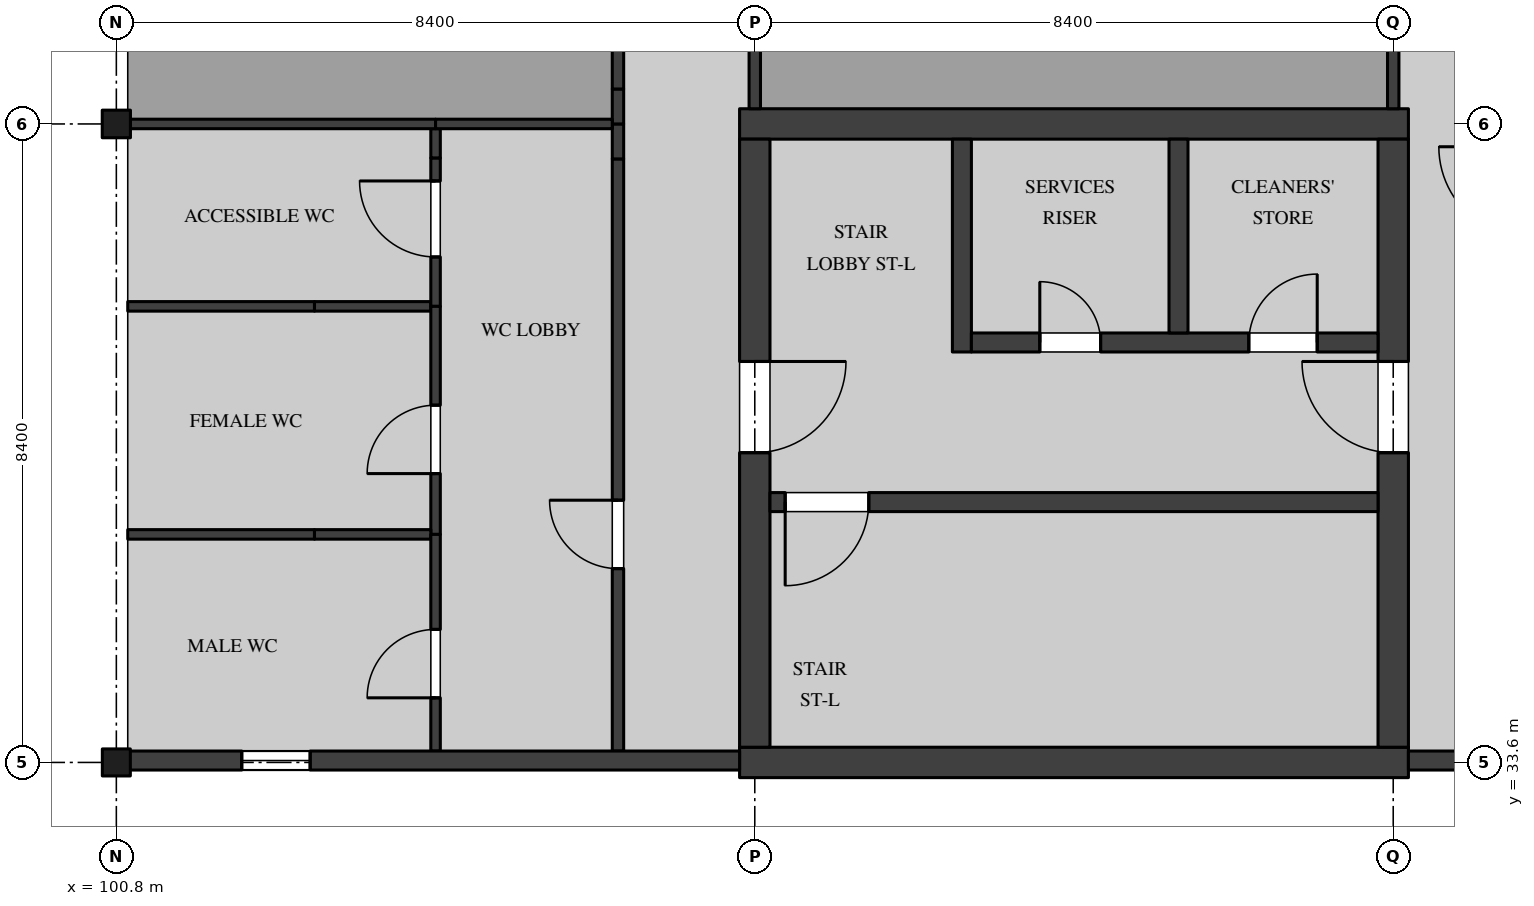
"""IFC4 building model, lengths in metres.
Left out: names, types, materials, properties, quantities, classifications, styles, units other than length and angle.
Written with IfcOpenShell. Run it as: python <this file> out.ifc"""

import sys

from ifc_helpers import new_model, si_unit, direction, frame, frame_2d, origin, origin_2d, place, context, subcontext, project, spatial, rectangle, i_section, extrude, element, fill, save


model = new_model("IFC4")
c1 = context("Model", 3, precision=1e-05, world=origin(), true_north=direction((0.0, 1.0)))
c2 = subcontext(c1, "Body", "Model", "MODEL_VIEW")
j1 = project(units=[si_unit("LENGTHUNIT", "METRE"), si_unit("PLANEANGLEUNIT", "RADIAN")], contexts=[c1])
p1 = place(None, origin())
s1 = spatial("IfcSite", under=j1, at=p1, CompositionType="ELEMENT")
p2 = place(p1, origin())
s2 = spatial("IfcBuilding", under=s1, at=p2, CompositionType="ELEMENT")
p3 = place(p2, frame((0.0, 0.0, 27.9)))
s3 = spatial("IfcBuildingStorey", under=s2, at=p3, CompositionType="ELEMENT", Elevation=27.9)
p4 = place(p3, frame((100.8, 33.6, 0.0), z_axis=(0.0, 0.0, 1.0), x_axis=(1.0, 0.0, 0.0)))
e1 = element("IfcColumn", 1, at=p4, inside=s3, PredefinedType="COLUMN", context=c2, shape_type="SweptSolid", body=[
    extrude(i_section(OverallWidth=0.368, OverallDepth=0.356, WebThickness=0.011, FlangeThickness=0.018, FilletRadius=0.015, at=origin_2d()), origin(), (0.0, 0.0, 1.0), 4.37),
])
p5 = place(p3, frame((100.8, 42.0, 0.0), z_axis=(0.0, 0.0, 1.0), x_axis=(1.0, 0.0, 0.0)))
e2 = element("IfcColumn", 2, at=p5, inside=s3, PredefinedType="COLUMN", context=c2, shape_type="SweptSolid", body=[
    extrude(i_section(OverallWidth=0.371, OverallDepth=0.363, WebThickness=0.013, FlangeThickness=0.022, FilletRadius=0.015, at=origin_2d()), origin(), (0.0, 0.0, 1.0), 4.37),
])
for number, where, z_axis, x_axis in (
    (3, (109.0, 33.6, 0.0), (0.0, 0.0, 1.0), (1.0, 0.0, 0.0)),
    (4, (109.0, 42.0, 0.0), (0.0, 0.0, 1.0), (1.0, 0.0, 0.0)),
):
    element("IfcWall", number, at=place(p3, frame(where, z_axis=z_axis, x_axis=x_axis)), inside=s3, PredefinedType="SHEAR", context=c2, shape_type="SweptSolid", body=[
        extrude(rectangle(XDim=8.8, YDim=0.4, at=frame_2d((4.4, 0.0))), origin(), (0.0, 0.0, 1.0), 4.37),
    ])
p6 = place(p3, frame((109.2, 33.8, 0.0), z_axis=(0.0, 0.0, 1.0), x_axis=(0.0, 1.0, 0.0)))
e5 = element("IfcWall", 5, at=p6, inside=s3, PredefinedType="SHEAR", context=c2, shape_type="SweptSolid", body=[
    extrude(rectangle(XDim=8.0, YDim=0.4, at=frame_2d((4.0, 0.0))), origin(), (0.0, 0.0, 1.0), 4.37),
])
p7 = place(p6, frame((3.875, 0.0, 0.0)))
e6 = element("IfcOpeningElement", 6, at=p7, cuts=e5, PredefinedType="OPENING", context=c2, shape_type="SweptSolid", body=[
    extrude(rectangle(XDim=1.2, YDim=2.1, at=frame_2d((0.6, 1.05))), frame((0.0, 0.21, 0.0), z_axis=(0.0, -1.0, 0.0), x_axis=(1.0, 0.0, 0.0)), (0.0, 0.0, 1.0), 0.42),
])
p8 = place(p3, frame((117.6, 33.8, 0.0), z_axis=(0.0, 0.0, 1.0), x_axis=(0.0, 1.0, 0.0)))
e7 = element("IfcWall", 7, at=p8, inside=s3, PredefinedType="SHEAR", context=c2, shape_type="SweptSolid", body=[
    extrude(rectangle(XDim=8.0, YDim=0.4, at=frame_2d((4.0, 0.0))), origin(), (0.0, 0.0, 1.0), 4.37),
])
p9 = place(p8, frame((3.875, 0.0, 0.0)))
e8 = element("IfcOpeningElement", 8, at=p9, cuts=e7, PredefinedType="OPENING", context=c2, shape_type="SweptSolid", body=[
    extrude(rectangle(XDim=1.2, YDim=2.1, at=frame_2d((0.6, 1.05))), frame((0.0, 0.21, 0.0), z_axis=(0.0, -1.0, 0.0), x_axis=(1.0, 0.0, 0.0)), (0.0, 0.0, 1.0), 0.42),
])
p10 = place(p3, frame((109.4, 37.025, 0.0), z_axis=(0.0, 0.0, 1.0), x_axis=(1.0, 0.0, 0.0)))
e9 = element("IfcWall", 9, at=p10, inside=s3, PredefinedType="SOLIDWALL", context=c2, shape_type="SweptSolid", body=[
    extrude(rectangle(XDim=8.0, YDim=0.25, at=frame_2d((4.0, 0.0))), origin(), (0.0, 0.0, 1.0), 4.37),
])
p11 = place(p10, frame((0.2, 0.0, 0.0)))
e10 = element("IfcOpeningElement", 10, at=p11, cuts=e9, PredefinedType="OPENING", context=c2, shape_type="SweptSolid", body=[
    extrude(rectangle(XDim=1.1, YDim=2.1, at=frame_2d((0.55, 1.05))), frame((0.0, 0.135, 0.0), z_axis=(0.0, -1.0, 0.0), x_axis=(1.0, 0.0, 0.0)), (0.0, 0.0, 1.0), 0.27),
])
p12 = place(p3, frame((111.925, 39.0, 0.0), z_axis=(0.0, 0.0, 1.0), x_axis=(0.0, 1.0, 0.0)))
e11 = element("IfcWall", 11, at=p12, inside=s3, PredefinedType="SOLIDWALL", context=c2, shape_type="SweptSolid", body=[
    extrude(rectangle(XDim=2.8, YDim=0.25, at=frame_2d((1.4, 0.0))), origin(), (0.0, 0.0, 1.0), 4.37),
])
p13 = place(p3, frame((112.05, 39.125, 0.0), z_axis=(0.0, 0.0, 1.0), x_axis=(1.0, 0.0, 0.0)))
e12 = element("IfcWall", 12, at=p13, inside=s3, PredefinedType="SOLIDWALL", context=c2, shape_type="SweptSolid", body=[
    extrude(rectangle(XDim=5.35, YDim=0.25, at=frame_2d((2.675, 0.0))), origin(), (0.0, 0.0, 1.0), 4.37),
])
p14 = place(p13, frame((3.65, 0.0, 0.0)))
e13 = element("IfcOpeningElement", 13, at=p14, cuts=e12, PredefinedType="OPENING", context=c2, shape_type="SweptSolid", body=[
    extrude(rectangle(XDim=0.9, YDim=2.1, at=frame_2d((0.45, 1.05))), frame((0.0, 0.135, 0.0), z_axis=(0.0, -1.0, 0.0), x_axis=(1.0, 0.0, 0.0)), (0.0, 0.0, 1.0), 0.27),
])
p15 = place(p13, frame((0.9, 0.0, 0.0)))
e14 = element("IfcOpeningElement", 14, at=p15, cuts=e12, PredefinedType="OPENING", context=c2, shape_type="SweptSolid", body=[
    extrude(rectangle(XDim=0.8, YDim=2.1, at=frame_2d((0.4, 1.05))), frame((0.0, 0.135, 0.0), z_axis=(0.0, -1.0, 0.0), x_axis=(1.0, 0.0, 0.0)), (0.0, 0.0, 1.0), 0.27),
])
p16 = place(p3, frame((114.775, 39.25, 0.0), z_axis=(0.0, 0.0, 1.0), x_axis=(0.0, 1.0, 0.0)))
e15 = element("IfcWall", 15, at=p16, inside=s3, PredefinedType="SOLIDWALL", context=c2, shape_type="SweptSolid", body=[
    extrude(rectangle(XDim=2.55, YDim=0.25, at=frame_2d((1.275, 0.0))), origin(), (0.0, 0.0, 1.0), 4.37),
])
p17 = place(p3, frame((117.6, 42.2, 0.0), z_axis=(0.0, 0.0, 1.0), x_axis=(0.0, 1.0, 0.0)))
e16 = element("IfcWall", 16, at=p17, inside=s3, PredefinedType="PARTITIONING", context=c2, shape_type="SweptSolid", body=[
    extrude(rectangle(XDim=8.0, YDim=0.15, at=frame_2d((4.0, 0.0))), origin(), (0.0, 0.0, 1.0), 3.746),
])
p18 = place(p17, frame((3.4, 0.0, 0.0)))
e17 = element("IfcOpeningElement", 17, at=p18, cuts=e16, PredefinedType="OPENING", context=c2, shape_type="SweptSolid", body=[
    extrude(rectangle(XDim=1.2, YDim=2.4, at=frame_2d((0.6, 1.2))), frame((0.0, 0.085, 0.0), z_axis=(0.0, -1.0, 0.0), x_axis=(1.0, 0.0, 0.0)), (0.0, 0.0, 1.0), 0.17),
])
p19 = place(p3, frame((109.2, 42.2, 0.0), z_axis=(0.0, 0.0, 1.0), x_axis=(0.0, 1.0, 0.0)))
e18 = element("IfcWall", 18, at=p19, inside=s3, PredefinedType="PARTITIONING", context=c2, shape_type="SweptSolid", body=[
    extrude(rectangle(XDim=8.0, YDim=0.15, at=frame_2d((4.0, 0.0))), origin(), (0.0, 0.0, 1.0), 3.746),
])
p20 = place(p19, frame((3.4, 0.0, 0.0)))
e19 = element("IfcOpeningElement", 19, at=p20, cuts=e18, PredefinedType="OPENING", context=c2, shape_type="SweptSolid", body=[
    extrude(rectangle(XDim=1.2, YDim=2.4, at=frame_2d((0.6, 1.2))), frame((0.0, 0.085, 0.0), z_axis=(0.0, -1.0, 0.0), x_axis=(1.0, 0.0, 0.0)), (0.0, 0.0, 1.0), 0.17),
])
p21 = place(p3, frame((107.4, 33.75, 0.0), z_axis=(0.0, 0.0, 1.0), x_axis=(0.0, 1.0, 0.0)))
e20 = element("IfcWall", 20, at=p21, inside=s3, PredefinedType="PARTITIONING", context=c2, shape_type="SweptSolid", body=[
    extrude(rectangle(XDim=7.79, YDim=0.15, at=frame_2d((3.895, 0.0))), origin(), (0.0, 0.0, 1.0), 4.37),
])
p22 = place(p21, frame((2.4, 0.0, 0.0)))
e21 = element("IfcOpeningElement", 21, at=p22, cuts=e20, PredefinedType="OPENING", context=c2, shape_type="SweptSolid", body=[
    extrude(rectangle(XDim=0.9, YDim=2.1, at=frame_2d((0.45, 1.05))), frame((0.0, 0.085, 0.0), z_axis=(0.0, -1.0, 0.0), x_axis=(1.0, 0.0, 0.0)), (0.0, 0.0, 1.0), 0.17),
])
for number, where, z_axis, x_axis in (
    (22, (107.4, 41.54, 0.0), (0.0, 0.0, 1.0), (0.0, 1.0, 0.0)),
    (23, (107.4, 42.0, 0.0), (0.0, 0.0, 1.0), (0.0, 1.0, 0.0)),
):
    element("IfcWall", number, at=place(p3, frame(where, z_axis=z_axis, x_axis=x_axis)), inside=s3, PredefinedType="PARTITIONING", context=c2, shape_type="SweptSolid", body=[
        extrude(rectangle(XDim=0.46, YDim=0.15, at=frame_2d((0.23, 0.0))), origin(), (0.0, 0.0, 1.0), 3.746),
    ])
p23 = place(p3, frame((107.4, 42.46, 0.0), z_axis=(0.0, 0.0, 1.0), x_axis=(0.0, 1.0, 0.0)))
e24 = element("IfcWall", 24, at=p23, inside=s3, PredefinedType="PARTITIONING", context=c2, shape_type="SweptSolid", body=[
    extrude(rectangle(XDim=7.71, YDim=0.15, at=frame_2d((3.855, 0.0))), origin(), (0.0, 0.0, 1.0), 4.37),
])
p24 = place(p3, frame((100.95, 39.6, 0.0), z_axis=(0.0, 0.0, 1.0), x_axis=(1.0, 0.0, 0.0)))
e25 = element("IfcWall", 25, at=p24, inside=s3, PredefinedType="PARTITIONING", context=c2, shape_type="SweptSolid", body=[
    extrude(rectangle(XDim=2.457, YDim=0.125, at=frame_2d((1.229, 0.0))), origin(), (0.0, 0.0, 1.0), 4.37),
])
p25 = place(p3, frame((103.407, 39.6, 0.0), z_axis=(0.0, 0.0, 1.0), x_axis=(1.0, 0.0, 0.0)))
e26 = element("IfcWall", 26, at=p25, inside=s3, PredefinedType="PARTITIONING", context=c2, shape_type="SweptSolid", body=[
    extrude(rectangle(XDim=1.531, YDim=0.125, at=frame_2d((0.766, 0.0))), origin(), (0.0, 0.0, 1.0), 3.895),
])
p26 = place(p3, frame((105.0, 39.6, 0.0), z_axis=(0.0, 0.0, 1.0), x_axis=(0.0, 1.0, 0.0)))
e27 = element("IfcWall", 27, at=p26, inside=s3, PredefinedType="PARTITIONING", context=c2, shape_type="SweptSolid", body=[
    extrude(rectangle(XDim=1.953, YDim=0.125, at=frame_2d((0.977, 0.0))), origin(), (0.0, 0.0, 1.0), 4.37),
])
p27 = place(p26, frame((0.65, 0.0, 0.0)))
e28 = element("IfcOpeningElement", 28, at=p27, cuts=e27, PredefinedType="OPENING", context=c2, shape_type="SweptSolid", body=[
    extrude(rectangle(XDim=1.0, YDim=2.1, at=frame_2d((0.5, 1.05))), frame((0.0, 0.073, 0.0), z_axis=(0.0, -1.0, 0.0), x_axis=(1.0, 0.0, 0.0)), (0.0, 0.0, 1.0), 0.145),
])
p28 = place(p3, frame((105.0, 41.553, 0.0), z_axis=(0.0, 0.0, 1.0), x_axis=(0.0, 1.0, 0.0)))
e29 = element("IfcWall", 29, at=p28, inside=s3, PredefinedType="PARTITIONING", context=c2, shape_type="SweptSolid", body=[
    extrude(rectangle(XDim=0.385, YDim=0.125, at=frame_2d((0.192, 0.0))), origin(), (0.0, 0.0, 1.0), 3.746),
])
p29 = place(p3, frame((100.986, 42.0, 0.0), z_axis=(0.0, 0.0, 1.0), x_axis=(1.0, 0.0, 0.0)))
e30 = element("IfcWall", 30, at=p29, inside=s3, PredefinedType="PARTITIONING", context=c2, shape_type="SweptSolid", body=[
    extrude(rectangle(XDim=4.014, YDim=0.125, at=frame_2d((2.007, 0.0))), origin(), (0.0, 0.0, 1.0), 3.746),
])
p30 = place(p3, frame((105.0, 36.6, 0.0), z_axis=(0.0, 0.0, 1.0), x_axis=(0.0, 1.0, 0.0)))
e31 = element("IfcWall", 31, at=p30, inside=s3, PredefinedType="PARTITIONING", context=c2, shape_type="SweptSolid", body=[
    extrude(rectangle(XDim=3.0, YDim=0.125, at=frame_2d((1.5, 0.0))), origin(), (0.0, 0.0, 1.0), 4.37),
])
p31 = place(p30, frame((0.8, 0.0, 0.0)))
e32 = element("IfcOpeningElement", 32, at=p31, cuts=e31, PredefinedType="OPENING", context=c2, shape_type="SweptSolid", body=[
    extrude(rectangle(XDim=0.9, YDim=2.1, at=frame_2d((0.45, 1.05))), frame((0.0, 0.073, 0.0), z_axis=(0.0, -1.0, 0.0), x_axis=(1.0, 0.0, 0.0)), (0.0, 0.0, 1.0), 0.145),
])
p32 = place(p3, frame((100.95, 36.6, 0.0), z_axis=(0.0, 0.0, 1.0), x_axis=(1.0, 0.0, 0.0)))
e33 = element("IfcWall", 33, at=p32, inside=s3, PredefinedType="PARTITIONING", context=c2, shape_type="SweptSolid", body=[
    extrude(rectangle(XDim=2.457, YDim=0.125, at=frame_2d((1.229, 0.0))), origin(), (0.0, 0.0, 1.0), 4.37),
])
p33 = place(p3, frame((103.407, 36.6, 0.0), z_axis=(0.0, 0.0, 1.0), x_axis=(1.0, 0.0, 0.0)))
e34 = element("IfcWall", 34, at=p33, inside=s3, PredefinedType="PARTITIONING", context=c2, shape_type="SweptSolid", body=[
    extrude(rectangle(XDim=1.531, YDim=0.125, at=frame_2d((0.766, 0.0))), origin(), (0.0, 0.0, 1.0), 3.895),
])
p34 = place(p3, frame((105.0, 33.75, 0.0), z_axis=(0.0, 0.0, 1.0), x_axis=(0.0, 1.0, 0.0)))
e35 = element("IfcWall", 35, at=p34, inside=s3, PredefinedType="PARTITIONING", context=c2, shape_type="SweptSolid", body=[
    extrude(rectangle(XDim=2.85, YDim=0.125, at=frame_2d((1.425, 0.0))), origin(), (0.0, 0.0, 1.0), 4.37),
])
p35 = place(p34, frame((0.7, 0.0, 0.0)))
e36 = element("IfcOpeningElement", 36, at=p35, cuts=e35, PredefinedType="OPENING", context=c2, shape_type="SweptSolid", body=[
    extrude(rectangle(XDim=0.9, YDim=2.1, at=frame_2d((0.45, 1.05))), frame((0.0, 0.073, 0.0), z_axis=(0.0, -1.0, 0.0), x_axis=(1.0, 0.0, 0.0)), (0.0, 0.0, 1.0), 0.145),
])
p36 = place(p3, frame((105.0, 42.0, 0.0), z_axis=(0.0, 0.0, 1.0), x_axis=(1.0, 0.0, 0.0)))
e37 = element("IfcWall", 37, at=p36, inside=s3, PredefinedType="PARTITIONING", context=c2, shape_type="SweptSolid", body=[
    extrude(rectangle(XDim=2.325, YDim=0.125, at=frame_2d((1.163, 0.0))), origin(), (0.0, 0.0, 1.0), 3.746),
])
p37 = place(p3, frame((100.804, 33.625, 0.0), z_axis=(0.0, 0.0, 1.0), x_axis=(1.0, 0.0, 0.0)))
e38 = element("IfcWall", 38, at=p37, inside=s3, PredefinedType="SOLIDWALL", context=c2, shape_type="SweptSolid", body=[
    extrude(rectangle(XDim=8.196, YDim=0.25, at=frame_2d((4.098, 0.0))), origin(), (0.0, 0.0, 1.0), 3.746),
])
p38 = place(p37, frame((1.646, 0.0, 1.5)))
e39 = element("IfcOpeningElement", 39, at=p38, cuts=e38, PredefinedType="OPENING", context=c2, shape_type="SweptSolid", body=[
    extrude(rectangle(XDim=0.9, YDim=1.2, at=frame_2d((0.45, 0.6))), frame((0.0, 0.135, 0.0), z_axis=(0.0, -1.0, 0.0), x_axis=(1.0, 0.0, 0.0)), (0.0, 0.0, 1.0), 0.27),
])
p39 = place(p3, frame((117.8, 33.625, 0.0), z_axis=(0.0, 0.0, 1.0), x_axis=(1.0, 0.0, 0.0)))
e40 = element("IfcWall", 40, at=p39, inside=s3, PredefinedType="SOLIDWALL", context=c2, shape_type="SweptSolid", body=[
    extrude(rectangle(XDim=8.199, YDim=0.25, at=frame_2d((4.1, 0.0))), origin(), (0.0, 0.0, 1.0), 3.746),
])
p40 = place(p39, frame((5.2, 0.0, 0.9)))
e41 = element("IfcOpeningElement", 41, at=p40, cuts=e40, PredefinedType="OPENING", context=c2, shape_type="SweptSolid", body=[
    extrude(rectangle(XDim=1.8, YDim=1.95, at=frame_2d((0.9, 0.975))), frame((0.0, 0.135, 0.0), z_axis=(0.0, -1.0, 0.0), x_axis=(1.0, 0.0, 0.0)), (0.0, 0.0, 1.0), 0.27),
])
p41 = place(p14, origin())
e42 = element("IfcDoor", 42, at=p41, inside=s3, OperationType="SINGLE_SWING_LEFT", PredefinedType="DOOR", context=c2, shape_type="SweptSolid", body=[
    extrude(rectangle(XDim=0.9, YDim=2.1, at=frame_2d((0.45, 1.05))), frame((0.0, 0.035, 0.0), z_axis=(0.0, -1.0, 0.0), x_axis=(1.0, 0.0, 0.0)), (0.0, 0.0, 1.0), 0.07),
])
fill(e13, e42)
p42 = place(p7, frame((1.2, 0.0, 0.0), z_axis=(0.0, 0.0, 1.0), x_axis=(-1.0, 0.0, 0.0)))
e43 = element("IfcDoor", 43, at=p42, inside=s3, OperationType="SINGLE_SWING_RIGHT", PredefinedType="DOOR", context=c2, shape_type="SweptSolid", body=[
    extrude(rectangle(XDim=1.2, YDim=2.1, at=frame_2d((0.6, 1.05))), frame((0.0, 0.035, 0.0), z_axis=(0.0, -1.0, 0.0), x_axis=(1.0, 0.0, 0.0)), (0.0, 0.0, 1.0), 0.07),
])
fill(e6, e43)
p43 = place(p9, origin())
e44 = element("IfcDoor", 44, at=p43, inside=s3, OperationType="SINGLE_SWING_LEFT", PredefinedType="DOOR", context=c2, shape_type="SweptSolid", body=[
    extrude(rectangle(XDim=1.2, YDim=2.1, at=frame_2d((0.6, 1.05))), frame((0.0, 0.035, 0.0), z_axis=(0.0, -1.0, 0.0), x_axis=(1.0, 0.0, 0.0)), (0.0, 0.0, 1.0), 0.07),
])
fill(e8, e44)
p44 = place(p15, origin())
e45 = element("IfcDoor", 45, at=p44, inside=s3, OperationType="SINGLE_SWING_RIGHT", PredefinedType="DOOR", context=c2, shape_type="SweptSolid", body=[
    extrude(rectangle(XDim=0.8, YDim=2.1, at=frame_2d((0.4, 1.05))), frame((0.0, 0.035, 0.0), z_axis=(0.0, -1.0, 0.0), x_axis=(1.0, 0.0, 0.0)), (0.0, 0.0, 1.0), 0.07),
])
fill(e14, e45)
p45 = place(p11, frame((1.1, 0.0, 0.0), z_axis=(0.0, 0.0, 1.0), x_axis=(-1.0, 0.0, 0.0)))
e46 = element("IfcDoor", 46, at=p45, inside=s3, OperationType="SINGLE_SWING_LEFT", PredefinedType="DOOR", context=c2, shape_type="SweptSolid", body=[
    extrude(rectangle(XDim=1.1, YDim=2.1, at=frame_2d((0.55, 1.05))), frame((0.0, 0.035, 0.0), z_axis=(0.0, -1.0, 0.0), x_axis=(1.0, 0.0, 0.0)), (0.0, 0.0, 1.0), 0.07),
])
fill(e10, e46)
p46 = place(p27, origin())
e47 = element("IfcDoor", 47, at=p46, inside=s3, OperationType="SINGLE_SWING_LEFT", PredefinedType="DOOR", context=c2, shape_type="SweptSolid", body=[
    extrude(rectangle(XDim=1.0, YDim=2.1, at=frame_2d((0.5, 1.05))), frame((0.0, 0.02, 0.0), z_axis=(0.0, -1.0, 0.0), x_axis=(1.0, 0.0, 0.0)), (0.0, 0.0, 1.0), 0.04),
])
fill(e28, e47)
p47 = place(p31, origin())
e48 = element("IfcDoor", 48, at=p47, inside=s3, OperationType="SINGLE_SWING_RIGHT", PredefinedType="DOOR", context=c2, shape_type="SweptSolid", body=[
    extrude(rectangle(XDim=0.9, YDim=2.1, at=frame_2d((0.45, 1.05))), frame((0.0, 0.02, 0.0), z_axis=(0.0, -1.0, 0.0), x_axis=(1.0, 0.0, 0.0)), (0.0, 0.0, 1.0), 0.04),
])
fill(e32, e48)
p48 = place(p22, origin())
e49 = element("IfcDoor", 49, at=p48, inside=s3, OperationType="SINGLE_SWING_LEFT", PredefinedType="DOOR", context=c2, shape_type="SweptSolid", body=[
    extrude(rectangle(XDim=0.9, YDim=2.1, at=frame_2d((0.45, 1.05))), frame((0.0, 0.025, 0.0), z_axis=(0.0, -1.0, 0.0), x_axis=(1.0, 0.0, 0.0)), (0.0, 0.0, 1.0), 0.05),
])
fill(e21, e49)
p49 = place(p35, origin())
e50 = element("IfcDoor", 50, at=p49, inside=s3, OperationType="SINGLE_SWING_RIGHT", PredefinedType="DOOR", context=c2, shape_type="SweptSolid", body=[
    extrude(rectangle(XDim=0.9, YDim=2.1, at=frame_2d((0.45, 1.05))), frame((0.0, 0.02, 0.0), z_axis=(0.0, -1.0, 0.0), x_axis=(1.0, 0.0, 0.0)), (0.0, 0.0, 1.0), 0.04),
])
fill(e36, e50)
p50 = place(p38, origin())
e51 = element("IfcWindow", 51, at=p50, inside=s3, PartitioningType="SINGLE_PANEL", PredefinedType="WINDOW", context=c2, shape_type="SweptSolid", body=[
    extrude(rectangle(XDim=0.9, YDim=1.2, at=frame_2d((0.45, 0.6))), frame((0.0, 0.04, 0.0), z_axis=(0.0, -1.0, 0.0), x_axis=(1.0, 0.0, 0.0)), (0.0, 0.0, 1.0), 0.08),
])
fill(e39, e51)
save(model, sys.argv[1])
